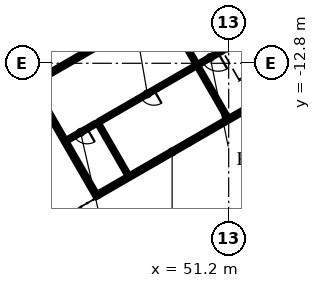
"""IFC4 building model, lengths in metres.
Left out: names, types, materials, properties, quantities, classifications, styles, units other than length and angle.
Written with IfcOpenShell. Run it as: python <this file> out.ifc"""

import sys

from ifc_helpers import new_model, si_unit, direction, frame, frame_2d, origin, place, context, subcontext, project, spatial, rectangle, extrude, element, fill, save


model = new_model("IFC4")
c1 = context("Model", 3, precision=1e-05, world=origin(), true_north=direction((0.0, 1.0)))
c2 = subcontext(c1, "Body", "Model", "MODEL_VIEW")
j1 = project(units=[si_unit("LENGTHUNIT", "METRE"), si_unit("PLANEANGLEUNIT", "RADIAN")], contexts=[c1])
p1 = place(None, origin())
s1 = spatial("IfcSite", under=j1, at=p1, CompositionType="ELEMENT")
p2 = place(p1, origin())
s2 = spatial("IfcBuilding", under=s1, at=p2, CompositionType="ELEMENT")
p3 = place(p2, frame((0.0, 0.0, 21.6)))
s3 = spatial("IfcBuildingStorey", under=s2, at=p3, CompositionType="ELEMENT", Elevation=21.6)
p4 = place(p3, frame((42.562, -21.615, 0.0), z_axis=(0.0, 0.0, 1.0), x_axis=(-0.499999331568, 0.866025789703, 0.0)))
e1 = element("IfcWall", 1, at=p4, inside=s3, PredefinedType="SOLIDWALL", context=c2, shape_type="SweptSolid", body=[
    extrude(rectangle(XDim=8.625, YDim=0.25, at=frame_2d((4.312, 0.0))), origin(), (0.0, 0.0, 1.0), 4.5),
])
p5 = place(p3, frame((46.397, -19.256, 0.0), z_axis=(0.0, 0.0, 1.0), x_axis=(-0.866022959057, -0.500004234368, 0.0)))
e2 = element("IfcWall", 2, at=p5, inside=s3, PredefinedType="SOLIDWALL", context=c2, shape_type="SweptSolid", body=[
    extrude(rectangle(XDim=4.375, YDim=0.25, at=frame_2d((2.188, 0.0))), origin(), (0.0, 0.0, 1.0), 4.5),
])
p6 = place(p3, frame((48.562, -18.006, 0.0), z_axis=(0.0, 0.0, 1.0), x_axis=(-0.866022959057, -0.500004234368, 0.0)))
e3 = element("IfcWall", 3, at=p6, inside=s3, PredefinedType="SOLIDWALL", context=c2, shape_type="SweptSolid", body=[
    extrude(rectangle(XDim=2.5, YDim=0.25, at=frame_2d((1.25, 0.0))), origin(), (0.0, 0.0, 1.0), 4.5),
])
p7 = place(p6, frame((0.25, 0.0, 0.9)))
e4 = element("IfcOpeningElement", 4, at=p7, cuts=e3, PredefinedType="OPENING", context=c2, shape_type="SweptSolid", body=[
    extrude(rectangle(XDim=2.0, YDim=1.8, at=frame_2d((1.0, 0.9))), frame((0.0, 0.135, 0.0), z_axis=(0.0, -1.0, 0.0), x_axis=(1.0, 0.0, 0.0)), (0.0, 0.0, 1.0), 0.27),
])
p8 = place(p3, frame((58.63, -12.194, 0.0), z_axis=(0.0, 0.0, 1.0), x_axis=(-0.866027159341, -0.499996959274, 0.0)))
e5 = element("IfcWall", 5, at=p8, inside=s3, PredefinedType="SOLIDWALL", context=c2, shape_type="SweptSolid", body=[
    extrude(rectangle(XDim=11.625, YDim=0.25, at=frame_2d((5.812, 0.0))), origin(), (0.0, 0.0, 1.0), 4.5),
])
p9 = place(p3, frame((49.443, -7.683, 0.0), z_axis=(0.0, 0.0, 1.0), x_axis=(-0.866025499775, -0.499999833739, 0.0)))
e6 = element("IfcWall", 6, at=p9, inside=s3, PredefinedType="SOLIDWALL", context=c2, shape_type="SweptSolid", body=[
    extrude(rectangle(XDim=12.8, YDim=0.25, at=frame_2d((6.4, 0.0))), origin(), (0.0, 0.0, 1.0), 4.5),
])
p10 = place(p3, frame((51.119, -16.385, 0.0), z_axis=(0.0, 0.0, 1.0), x_axis=(-0.49999894854, 0.866026010844, 0.0)))
e7 = element("IfcWall", 7, at=p10, inside=s3, PredefinedType="SOLIDWALL", context=c2, shape_type="SweptSolid", body=[
    extrude(rectangle(XDim=4.0, YDim=0.2, at=frame_2d((2.0, 0.0))), origin(), (0.0, 0.0, 1.0), 4.5),
])
p11 = place(p3, frame((50.722, -11.996, 0.0), z_axis=(0.0, 0.0, 1.0), x_axis=(-0.866036909293, -0.499980071345, 0.0)))
e8 = element("IfcWall", 8, at=p11, inside=s3, PredefinedType="SOLIDWALL", context=c2, shape_type="SweptSolid", body=[
    extrude(rectangle(XDim=1.75, YDim=0.2, at=frame_2d((0.875, 0.0))), origin(), (0.0, 0.0, 1.0), 4.5),
])
p12 = place(p11, frame((0.25, 0.0, 0.0)))
e9 = element("IfcOpeningElement", 9, at=p12, cuts=e8, PredefinedType="OPENING", context=c2, shape_type="SweptSolid", body=[
    extrude(rectangle(XDim=1.2, YDim=2.1, at=frame_2d((0.6, 1.05))), frame((0.0, 0.11, 0.0), z_axis=(0.0, -1.0, 0.0), x_axis=(1.0, 0.0, 0.0)), (0.0, 0.0, 1.0), 0.22),
])
p13 = place(p3, frame((50.722, -11.996, 0.0), z_axis=(0.0, 0.0, 1.0), x_axis=(0.866027239912, 0.49999681972, 0.0)))
e10 = element("IfcWall", 10, at=p13, inside=s3, PredefinedType="SOLIDWALL", context=c2, shape_type="SweptSolid", body=[
    extrude(rectangle(XDim=6.65, YDim=0.2, at=frame_2d((3.325, 0.0))), origin(), (0.0, 0.0, 1.0), 4.5),
])
p14 = place(p3, frame((49.07, -12.835, 0.0), z_axis=(0.0, 0.0, 1.0), x_axis=(-0.500062241894, 0.865989465428, 0.0)))
e11 = element("IfcWall", 11, at=p14, inside=s3, PredefinedType="PARTITIONING", context=c2, shape_type="SweptSolid", body=[
    extrude(rectangle(XDim=1.7, YDim=0.2, at=frame_2d((0.85, 0.0))), origin(), (0.0, 0.0, 1.0), 4.5),
])
p15 = place(p3, frame((44.581, -20.16, 0.0), z_axis=(0.0, 0.0, 1.0), x_axis=(-0.49999894854, 0.866026010844, 0.0)))
e12 = element("IfcWall", 12, at=p15, inside=s3, PredefinedType="PARTITIONING", context=c2, shape_type="SweptSolid", body=[
    extrude(rectangle(XDim=4.0, YDim=0.2, at=frame_2d((2.0, 0.0))), origin(), (0.0, 0.0, 1.0), 4.5),
])
p16 = place(p3, frame((42.494, -16.746, 0.0), z_axis=(0.0, 0.0, 1.0), x_axis=(-0.866017533419, -0.500013631625, 0.0)))
e13 = element("IfcWall", 13, at=p16, inside=s3, PredefinedType="PARTITIONING", context=c2, shape_type="SweptSolid", body=[
    extrude(rectangle(XDim=2.25, YDim=0.2, at=frame_2d((1.125, 0.0))), origin(), (0.0, 0.0, 1.0), 4.5),
])
p17 = place(p16, frame((0.7, 0.0, 0.0)))
e14 = element("IfcOpeningElement", 14, at=p17, cuts=e13, PredefinedType="OPENING", context=c2, shape_type="SweptSolid", body=[
    extrude(rectangle(XDim=1.0, YDim=2.1, at=frame_2d((0.5, 1.05))), frame((0.0, 0.11, 0.0), z_axis=(0.0, -1.0, 0.0), x_axis=(1.0, 0.0, 0.0)), (0.0, 0.0, 1.0), 0.22),
])
p18 = place(p3, frame((42.667, -16.646, 0.0), z_axis=(0.0, 0.0, 1.0), x_axis=(0.86601045545, 0.500025890382, 0.0)))
e15 = element("IfcWall", 15, at=p18, inside=s3, PredefinedType="PARTITIONING", context=c2, shape_type="SweptSolid", body=[
    extrude(rectangle(XDim=2.925, YDim=0.2, at=frame_2d((1.462, 0.0))), origin(), (0.0, 0.0, 1.0), 4.5),
])
p19 = place(p3, frame((46.5, -14.434, 0.0), z_axis=(0.0, 0.0, 1.0), x_axis=(-0.866031096941, -0.499990139034, 0.0)))
e16 = element("IfcWall", 16, at=p19, inside=s3, PredefinedType="PARTITIONING", context=c2, shape_type="SweptSolid", body=[
    extrude(rectangle(XDim=1.5, YDim=0.2, at=frame_2d((0.75, 0.0))), origin(), (0.0, 0.0, 1.0), 4.5),
])
p20 = place(p19, frame((0.25, 0.0, 0.0)))
e17 = element("IfcOpeningElement", 17, at=p20, cuts=e16, PredefinedType="OPENING", context=c2, shape_type="SweptSolid", body=[
    extrude(rectangle(XDim=1.0, YDim=2.1, at=frame_2d((0.5, 1.05))), frame((0.0, 0.11, 0.0), z_axis=(0.0, -1.0, 0.0), x_axis=(1.0, 0.0, 0.0)), (0.0, 0.0, 1.0), 0.22),
])
p21 = place(p3, frame((46.5, -14.434, 0.0), z_axis=(0.0, 0.0, 1.0), x_axis=(0.866046596414, 0.499963291492, 0.0)))
e18 = element("IfcWall", 18, at=p21, inside=s3, PredefinedType="PARTITIONING", context=c2, shape_type="SweptSolid", body=[
    extrude(rectangle(XDim=2.925, YDim=0.2, at=frame_2d((1.462, 0.0))), origin(), (0.0, 0.0, 1.0), 4.5),
])
p22 = place(p7, origin())
e19 = element("IfcWindow", 19, at=p22, inside=s3, PartitioningType="SINGLE_PANEL", PredefinedType="WINDOW", context=c2, shape_type="SweptSolid", body=[
    extrude(rectangle(XDim=2.0, YDim=1.8, at=frame_2d((1.0, 0.9))), frame((0.0, 0.03, 0.0), z_axis=(0.0, -1.0, 0.0), x_axis=(1.0, 0.0, 0.0)), (0.0, 0.0, 1.0), 0.06),
])
fill(e4, e19)
p23 = place(p12, origin())
e20 = element("IfcDoor", 20, at=p23, inside=s3, OperationType="SINGLE_SWING_LEFT", PredefinedType="DOOR", context=c2, shape_type="SweptSolid", body=[
    extrude(rectangle(XDim=1.2, YDim=2.1, at=frame_2d((0.6, 1.05))), frame((0.0, 0.025, 0.0), z_axis=(0.0, -1.0, 0.0), x_axis=(1.0, 0.0, 0.0)), (0.0, 0.0, 1.0), 0.05),
])
fill(e9, e20)
p24 = place(p17, origin())
e21 = element("IfcDoor", 21, at=p24, inside=s3, OperationType="SINGLE_SWING_LEFT", PredefinedType="DOOR", context=c2, shape_type="SweptSolid", body=[
    extrude(rectangle(XDim=1.0, YDim=2.1, at=frame_2d((0.5, 1.05))), frame((0.0, 0.025, 0.0), z_axis=(0.0, -1.0, 0.0), x_axis=(1.0, 0.0, 0.0)), (0.0, 0.0, 1.0), 0.05),
])
fill(e14, e21)
p25 = place(p20, origin())
e22 = element("IfcDoor", 22, at=p25, inside=s3, OperationType="SINGLE_SWING_LEFT", PredefinedType="DOOR", context=c2, shape_type="SweptSolid", body=[
    extrude(rectangle(XDim=1.0, YDim=2.1, at=frame_2d((0.5, 1.05))), frame((0.0, 0.025, 0.0), z_axis=(0.0, -1.0, 0.0), x_axis=(1.0, 0.0, 0.0)), (0.0, 0.0, 1.0), 0.05),
])
fill(e17, e22)
save(model, sys.argv[1])
